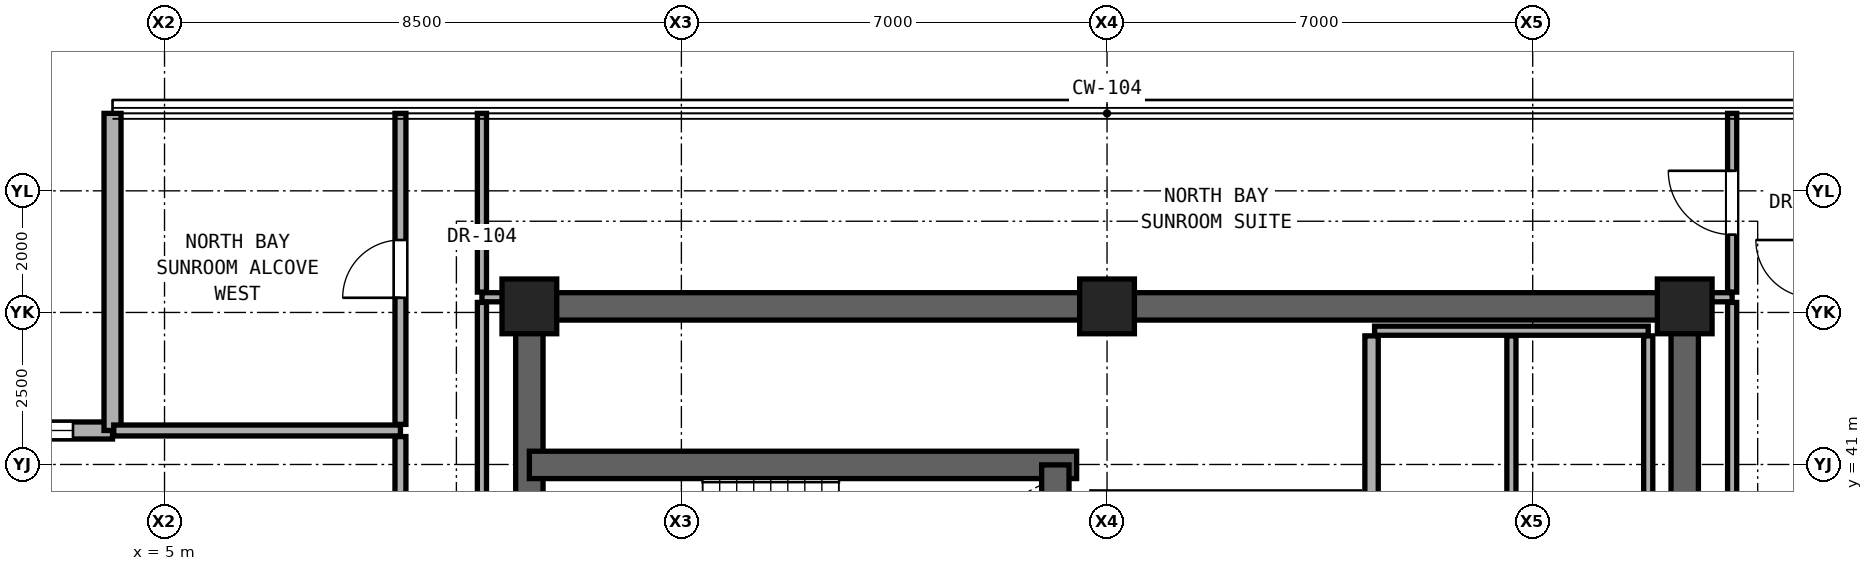
"""IFC4 building model, lengths in metres.
Left out: names, types, materials, properties, quantities, classifications, styles, units other than length and angle.
Written with IfcOpenShell. Run it as: python <this file> out.ifc"""

import sys

from ifc_helpers import new_model, si_unit, direction, frame, frame_2d, origin, origin_2d, place, context, subcontext, project, spatial, rectangle, extrude, element, fill, save


model = new_model("IFC4")
c1 = context("Model", 3, precision=1e-05, world=origin(), true_north=direction((0.0, 1.0)))
c2 = subcontext(c1, "Body", "Model", "MODEL_VIEW")
j1 = project(units=[si_unit("LENGTHUNIT", "METRE"), si_unit("PLANEANGLEUNIT", "RADIAN")], contexts=[c1])
p1 = place(None, origin())
s1 = spatial("IfcSite", under=j1, at=p1, CompositionType="ELEMENT")
p2 = place(p1, origin())
s2 = spatial("IfcBuilding", under=s1, at=p2, CompositionType="ELEMENT")
p3 = place(p2, frame((0.0, 0.0, 209.65)))
s3 = spatial("IfcBuildingStorey", under=s2, at=p3, CompositionType="ELEMENT", Elevation=209.65)
for number, where, z_axis, x_axis in (
    (1, (11.0, 43.6, 0.0), (0.0, 0.0, 1.0), (1.0, 0.0, 0.0)),
    (2, (20.5, 43.6, 0.0), (0.0, 0.0, 1.0), (1.0, 0.0, 0.0)),
    (3, (30.0, 43.6, 0.0), (0.0, 0.0, 1.0), (1.0, 0.0, 0.0)),
):
    element("IfcColumn", number, at=place(p3, frame(where, z_axis=z_axis, x_axis=x_axis)), inside=s3, PredefinedType="COLUMN", context=c2, shape_type="SweptSolid", body=[
        extrude(rectangle(XDim=0.9, YDim=0.9, at=origin_2d()), origin(), (0.0, 0.0, 1.0), 3.25),
    ])
p4 = place(p3, frame((11.0, 43.6, 0.0), z_axis=(0.0, 0.0, 1.0), x_axis=(1.0, 0.0, 0.0)))
e4 = element("IfcWall", 4, at=p4, inside=s3, PredefinedType="SHEAR", context=c2, shape_type="SweptSolid", body=[
    extrude(rectangle(XDim=19.0, YDim=0.45, at=frame_2d((9.5, 0.0))), origin(), (0.0, 0.0, 1.0), 2.89),
])
for number, where, z_axis, x_axis in (
    (5, (11.0, 37.6, 0.0), (0.0, 0.0, 1.0), (0.0, 1.0, 0.0)),
    (6, (30.0, 37.6, 0.0), (0.0, 0.0, 1.0), (0.0, 1.0, 0.0)),
):
    element("IfcWall", number, at=place(p3, frame(where, z_axis=z_axis, x_axis=x_axis)), inside=s3, PredefinedType="SHEAR", context=c2, shape_type="SweptSolid", body=[
        extrude(rectangle(XDim=6.0, YDim=0.45, at=frame_2d((3.0, 0.0))), origin(), (0.0, 0.0, 1.0), 2.89),
    ])
p5 = place(p3, frame((11.0, 40.993, 0.0), z_axis=(0.0, 0.0, 1.0), x_axis=(1.0, 0.0, 0.0)))
e7 = element("IfcWall", 7, at=p5, inside=s3, PredefinedType="SHEAR", context=c2, shape_type="SweptSolid", body=[
    extrude(rectangle(XDim=9.0, YDim=0.45, at=frame_2d((4.5, 0.0))), origin(), (0.0, 0.0, 1.0), 2.89),
])
p6 = place(p3, frame((19.65, 37.6, 0.0), z_axis=(0.0, 0.0, 1.0), x_axis=(0.0, 1.0, 0.0)))
e8 = element("IfcWall", 8, at=p6, inside=s3, PredefinedType="SHEAR", context=c2, shape_type="SweptSolid", body=[
    extrude(rectangle(XDim=3.393, YDim=0.45, at=frame_2d((1.696, 0.0))), origin(), (0.0, 0.0, 1.0), 2.89),
])
p7 = place(p3, frame((4.145, 41.559, 0.0), z_axis=(0.0, 0.0, 1.0), x_axis=(-1.0, 0.0, 0.0)))
e9 = element("IfcWall", 9, at=p7, inside=s3, PredefinedType="SOLIDWALL", context=c2, shape_type="SweptSolid", body=[
    extrude(rectangle(XDim=5.215, YDim=0.28, at=frame_2d((2.607, 0.0))), origin(), (0.0, 0.0, 1.0), 2.51),
])
p8 = place(p7, frame((0.65, 0.0, 0.36)))
e10 = element("IfcOpeningElement", 10, at=p8, cuts=e9, PredefinedType="OPENING", context=c2, shape_type="SweptSolid", body=[
    extrude(rectangle(XDim=1.1, YDim=2.0, at=frame_2d((0.55, 1.0))), frame((0.0, 0.15, 0.0), z_axis=(0.0, -1.0, 0.0), x_axis=(1.0, 0.0, 0.0)), (0.0, 0.0, 1.0), 0.3),
])
p9 = place(p3, frame((4.145, 46.774, 0.0), z_axis=(0.0, 0.0, 1.0), x_axis=(0.0, -1.0, 0.0)))
e11 = element("IfcWall", 11, at=p9, inside=s3, PredefinedType="SOLIDWALL", context=c2, shape_type="SweptSolid", body=[
    extrude(rectangle(XDim=5.215, YDim=0.28, at=frame_2d((2.607, 0.0))), origin(), (0.0, 0.0, 1.0), 2.51),
])
p10 = place(p3, frame((4.165, 41.559, 0.0), z_axis=(0.0, 0.0, 1.0), x_axis=(1.0, 0.0, 0.0)))
e12 = element("IfcWall", 12, at=p10, inside=s3, PredefinedType="PARTITIONING", context=c2, shape_type="SweptSolid", body=[
    extrude(rectangle(XDim=4.715, YDim=0.18, at=frame_2d((2.357, 0.0))), origin(), (0.0, 0.0, 1.0), 2.89),
])
p11 = place(p3, frame((24.9, 43.2, 0.0), z_axis=(0.0, 0.0, 1.0), x_axis=(1.0, 0.0, 0.0)))
e13 = element("IfcWall", 13, at=p11, inside=s3, PredefinedType="PARTITIONING", context=c2, shape_type="SweptSolid", body=[
    extrude(rectangle(XDim=4.5, YDim=0.15, at=frame_2d((2.25, 0.0))), origin(), (0.0, 0.0, 1.0), 2.89),
])
for number, where, z_axis, x_axis in (
    (14, (10.22, 43.75, 0.0), (0.0, 0.0, 1.0), (1.0, 0.0, 0.0)),
    (15, (30.22, 43.75, 0.0), (0.0, 0.0, 1.0), (1.0, 0.0, 0.0)),
):
    element("IfcWall", number, at=place(p3, frame(where, z_axis=z_axis, x_axis=x_axis)), inside=s3, PredefinedType="PARTITIONING", context=c2, shape_type="SweptSolid", body=[
        extrude(rectangle(XDim=0.56, YDim=0.15, at=frame_2d((0.28, 0.0))), origin(), (0.0, 0.0, 1.0), 2.89),
    ])
p12 = place(p3, frame((8.88, 33.6, 0.0), z_axis=(0.0, 0.0, 1.0), x_axis=(0.0, 1.0, 0.0)))
e16 = element("IfcWall", 16, at=p12, inside=s3, PredefinedType="PARTITIONING", context=c2, shape_type="SweptSolid", body=[
    extrude(rectangle(XDim=7.859, YDim=0.18, at=frame_2d((3.929, 0.0))), origin(), (0.0, 0.0, 1.0), 2.282),
])
p13 = place(p12, frame((3.405, 0.0, 0.0)))
e17 = element("IfcOpeningElement", 17, at=p13, cuts=e16, PredefinedType="OPENING", context=c2, shape_type="SweptSolid", body=[
    extrude(rectangle(XDim=1.05, YDim=2.2, at=frame_2d((0.525, 1.1))), frame((0.0, 0.1, 0.0), z_axis=(0.0, -1.0, 0.0), x_axis=(1.0, 0.0, 0.0)), (0.0, 0.0, 1.0), 0.2),
])
p14 = place(p3, frame((8.88, 41.659, 0.0), z_axis=(0.0, 0.0, 1.0), x_axis=(0.0, 1.0, 0.0)))
e18 = element("IfcWall", 18, at=p14, inside=s3, PredefinedType="PARTITIONING", context=c2, shape_type="SweptSolid", body=[
    extrude(rectangle(XDim=5.115, YDim=0.18, at=frame_2d((2.558, 0.0))), origin(), (0.0, 0.0, 1.0), 2.89),
])
p15 = place(p14, frame((2.083, 0.0, 0.0)))
e19 = element("IfcOpeningElement", 19, at=p15, cuts=e18, PredefinedType="OPENING", context=c2, shape_type="SweptSolid", body=[
    extrude(rectangle(XDim=0.95, YDim=2.15, at=frame_2d((0.475, 1.075))), frame((0.0, 0.1, 0.0), z_axis=(0.0, -1.0, 0.0), x_axis=(1.0, 0.0, 0.0)), (0.0, 0.0, 1.0), 0.2),
])
p16 = place(p3, frame((10.22, 34.535, 0.0), z_axis=(0.0, 0.0, 1.0), x_axis=(0.0, 1.0, 0.0)))
e20 = element("IfcWall", 20, at=p16, inside=s3, PredefinedType="PARTITIONING", context=c2, shape_type="SweptSolid", body=[
    extrude(rectangle(XDim=9.13, YDim=0.15, at=frame_2d((4.565, 0.0))), origin(), (0.0, 0.0, 1.0), 2.282),
])
p17 = place(p3, frame((10.22, 43.835, 0.0), z_axis=(0.0, 0.0, 1.0), x_axis=(0.0, 1.0, 0.0)))
e21 = element("IfcWall", 21, at=p17, inside=s3, PredefinedType="PARTITIONING", context=c2, shape_type="SweptSolid", body=[
    extrude(rectangle(XDim=2.939, YDim=0.15, at=frame_2d((1.469, 0.0))), origin(), (0.0, 0.0, 1.0), 2.89),
])
p18 = place(p3, frame((24.85, 40.26, 0.0), z_axis=(0.0, 0.0, 1.0), x_axis=(0.0, 1.0, 0.0)))
e22 = element("IfcWall", 22, at=p18, inside=s3, PredefinedType="SOLIDWALL", context=c2, shape_type="SweptSolid", body=[
    extrude(rectangle(XDim=2.855, YDim=0.22, at=frame_2d((1.427, 0.0))), origin(), (0.0, 0.0, 1.0), 2.89),
])
for number, where, z_axis, x_axis in (
    (23, (27.15, 37.82, 0.0), (0.0, 0.0, 1.0), (0.0, 1.0, 0.0)),
    (24, (29.4, 37.82, 0.0), (0.0, 0.0, 1.0), (0.0, 1.0, 0.0)),
):
    element("IfcWall", number, at=place(p3, frame(where, z_axis=z_axis, x_axis=x_axis)), inside=s3, PredefinedType="PARTITIONING", context=c2, shape_type="SweptSolid", body=[
        extrude(rectangle(XDim=5.295, YDim=0.15, at=frame_2d((2.647, 0.0))), origin(), (0.0, 0.0, 1.0), 2.89),
    ])
p19 = place(p3, frame((30.78, 34.57, 0.0), z_axis=(0.0, 0.0, 1.0), x_axis=(0.0, 1.0, 0.0)))
e25 = element("IfcWall", 25, at=p19, inside=s3, PredefinedType="PARTITIONING", context=c2, shape_type="SweptSolid", body=[
    extrude(rectangle(XDim=9.095, YDim=0.15, at=frame_2d((4.547, 0.0))), origin(), (0.0, 0.0, 1.0), 2.282),
])
p20 = place(p3, frame((30.78, 43.835, 0.0), z_axis=(0.0, 0.0, 1.0), x_axis=(0.0, 1.0, 0.0)))
e26 = element("IfcWall", 26, at=p20, inside=s3, PredefinedType="PARTITIONING", context=c2, shape_type="SweptSolid", body=[
    extrude(rectangle(XDim=2.939, YDim=0.15, at=frame_2d((1.469, 0.0))), origin(), (0.0, 0.0, 1.0), 2.89),
])
p21 = place(p20, frame((0.945, 0.0, 0.0)))
e27 = element("IfcOpeningElement", 27, at=p21, cuts=e26, PredefinedType="OPENING", context=c2, shape_type="SweptSolid", body=[
    extrude(rectangle(XDim=1.05, YDim=2.2, at=frame_2d((0.525, 1.1))), frame((0.0, 0.085, 0.0), z_axis=(0.0, -1.0, 0.0), x_axis=(1.0, 0.0, 0.0)), (0.0, 0.0, 1.0), 0.17),
])
p22 = place(p8, origin())
e28 = element("IfcWindow", 28, at=p22, inside=s3, PartitioningType="SINGLE_PANEL", PredefinedType="WINDOW", context=c2, shape_type="SweptSolid", body=[
    extrude(rectangle(XDim=1.1, YDim=2.0, at=frame_2d((0.55, 1.0))), frame((0.0, 0.03, 0.0), z_axis=(0.0, -1.0, 0.0), x_axis=(1.0, 0.0, 0.0)), (0.0, 0.0, 1.0), 0.06),
])
fill(e10, e28)
p23 = place(p21, origin())
e29 = element("IfcDoor", 29, at=p23, inside=s3, OperationType="SINGLE_SWING_RIGHT", PredefinedType="DOOR", context=c2, shape_type="SweptSolid", body=[
    extrude(rectangle(XDim=1.05, YDim=2.2, at=frame_2d((0.525, 1.1))), frame((0.0, 0.025, 0.0), z_axis=(0.0, -1.0, 0.0), x_axis=(1.0, 0.0, 0.0)), (0.0, 0.0, 1.0), 0.05),
])
fill(e27, e29)
p24 = place(p15, origin())
e30 = element("IfcDoor", 30, at=p24, inside=s3, OperationType="SINGLE_SWING_LEFT", PredefinedType="DOOR", context=c2, shape_type="SweptSolid", body=[
    extrude(rectangle(XDim=0.95, YDim=2.15, at=frame_2d((0.475, 1.075))), frame((0.0, 0.025, 0.0), z_axis=(0.0, -1.0, 0.0), x_axis=(1.0, 0.0, 0.0)), (0.0, 0.0, 1.0), 0.05),
])
fill(e19, e30)
save(model, sys.argv[1])
